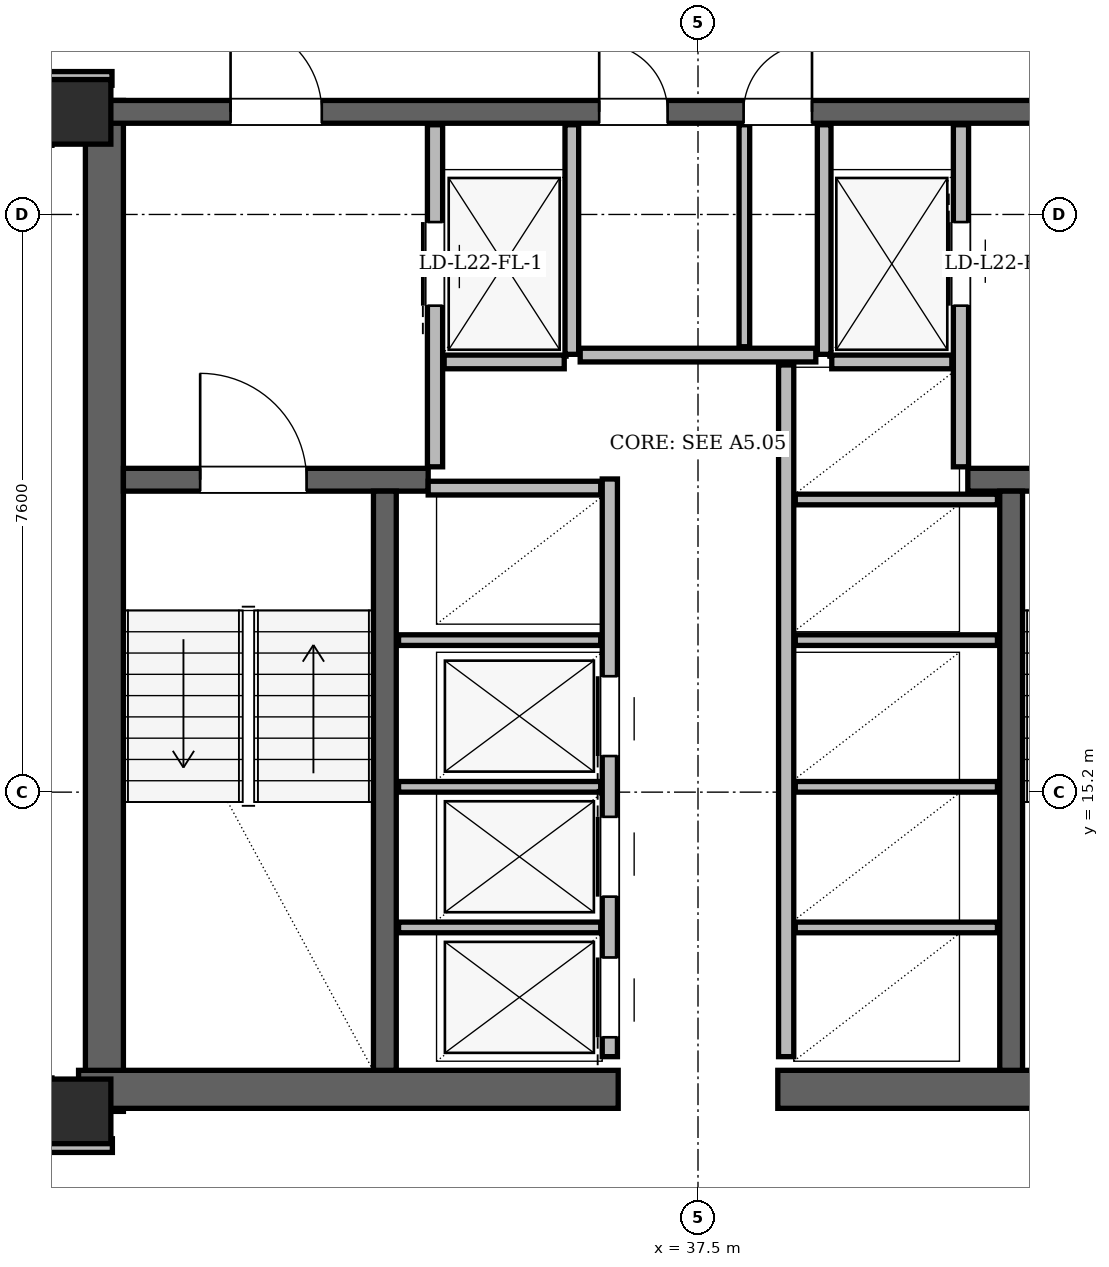
"""IFC4 building model, lengths in metres.
Left out: names, types, materials, properties, quantities, classifications, styles, units other than length and angle.
Written with IfcOpenShell. Run it as: python <this file> out.ifc"""

import sys

from ifc_helpers import new_model, si_unit, direction, frame, frame_2d, origin, origin_2d, place, context, subcontext, project, spatial, rectangle, hollow_rectangle, extrude, element, fill, save


model = new_model("IFC4")
c1 = context("Model", 3, precision=1e-05, world=origin(), true_north=direction((0.0, 1.0)))
c2 = subcontext(c1, "Body", "Model", "MODEL_VIEW")
j1 = project(units=[si_unit("LENGTHUNIT", "METRE"), si_unit("PLANEANGLEUNIT", "RADIAN")], contexts=[c1])
p1 = place(None, origin())
s1 = spatial("IfcSite", under=j1, at=p1, CompositionType="ELEMENT")
p2 = place(p1, origin())
s2 = spatial("IfcBuilding", under=s1, at=p2, CompositionType="ELEMENT")
p3 = place(p2, frame((0.0, 0.0, 86.1)))
s3 = spatial("IfcBuildingStorey", under=s2, at=p3, CompositionType="ELEMENT", Elevation=86.1)
for number, where, z_axis, x_axis in (
    (1, (29.35, 11.0, 0.0), (0.0, 0.0, 1.0), (1.0, 0.0, 0.0)),
    (2, (29.35, 24.15, 0.0), (0.0, 0.0, 1.0), (1.0, 0.0, 0.0)),
):
    element("IfcColumn", number, at=place(p3, frame(where, z_axis=z_axis, x_axis=x_axis)), inside=s3, PredefinedType="COLUMN", context=c2, shape_type="SweptSolid", body=[
        extrude(hollow_rectangle(XDim=0.85, YDim=0.85, WallThickness=0.07, at=origin_2d()), origin(), (0.0, 0.0, 1.0), 3.6),
    ])
p4 = place(p3, frame((29.69, 11.0, 0.0), z_axis=(0.0, 0.0, 1.0), x_axis=(0.0, 1.0, 0.0)))
e3 = element("IfcWall", 3, at=p4, inside=s3, PredefinedType="SHEAR", context=c2, shape_type="SweptSolid", body=[
    extrude(rectangle(XDim=13.3, YDim=0.5, at=frame_2d((6.65, 0.0))), origin(), (0.0, 0.0, 1.0), 3.36),
])
for number, where, z_axis, x_axis in (
    (4, (29.35, 11.29, 0.0), (0.0, 0.0, 1.0), (1.0, 0.0, 0.0)),
    (5, (38.55, 11.29, 0.0), (0.0, 0.0, 1.0), (1.0, 0.0, 0.0)),
):
    element("IfcWall", number, at=place(p3, frame(where, z_axis=z_axis, x_axis=x_axis)), inside=s3, PredefinedType="SHEAR", context=c2, shape_type="SweptSolid", body=[
        extrude(rectangle(XDim=7.1, YDim=0.5, at=frame_2d((3.55, 0.0))), origin(), (0.0, 0.0, 1.0), 3.36),
    ])
p5 = place(p3, frame((29.65, 24.15, 0.0), z_axis=(0.0, 0.0, 1.0), x_axis=(1.0, 0.0, 0.0)))
e6 = element("IfcWall", 6, at=p5, inside=s3, PredefinedType="SHEAR", context=c2, shape_type="SweptSolid", body=[
    extrude(rectangle(XDim=15.7, YDim=0.3, at=frame_2d((7.85, 0.0))), origin(), (0.0, 0.0, 1.0), 3.36),
])
p6 = place(p5, frame((1.7, 0.0, 0.0)))
e7 = element("IfcOpeningElement", 7, at=p6, cuts=e6, PredefinedType="OPENING", context=c2, shape_type="SweptSolid", body=[
    extrude(rectangle(XDim=1.2, YDim=2.2, at=frame_2d((0.6, 1.1))), frame((0.0, 0.15, 0.0), z_axis=(0.0, -1.0, 0.0), x_axis=(1.0, 0.0, 0.0)), (0.0, 0.0, 1.0), 0.3),
])
p7 = place(p5, frame((12.8, 0.0, 0.0)))
e8 = element("IfcOpeningElement", 8, at=p7, cuts=e6, PredefinedType="OPENING", context=c2, shape_type="SweptSolid", body=[
    extrude(rectangle(XDim=1.2, YDim=2.2, at=frame_2d((0.6, 1.1))), frame((0.0, 0.15, 0.0), z_axis=(0.0, -1.0, 0.0), x_axis=(1.0, 0.0, 0.0)), (0.0, 0.0, 1.0), 0.3),
])
p8 = place(p5, frame((6.55, 0.0, 0.0)))
e9 = element("IfcOpeningElement", 9, at=p8, cuts=e6, PredefinedType="OPENING", context=c2, shape_type="SweptSolid", body=[
    extrude(rectangle(XDim=0.9, YDim=2.05, at=frame_2d((0.45, 1.025))), frame((0.0, 0.15, 0.0), z_axis=(0.0, -1.0, 0.0), x_axis=(1.0, 0.0, 0.0)), (0.0, 0.0, 1.0), 0.3),
])
p9 = place(p5, frame((8.45, 0.0, 0.0)))
e10 = element("IfcOpeningElement", 10, at=p9, cuts=e6, PredefinedType="OPENING", context=c2, shape_type="SweptSolid", body=[
    extrude(rectangle(XDim=0.9, YDim=2.05, at=frame_2d((0.45, 1.025))), frame((0.0, 0.15, 0.0), z_axis=(0.0, -1.0, 0.0), x_axis=(1.0, 0.0, 0.0)), (0.0, 0.0, 1.0), 0.3),
])
p10 = place(p3, frame((29.94, 19.31, 0.0), z_axis=(0.0, 0.0, 1.0), x_axis=(1.0, 0.0, 0.0)))
e11 = element("IfcWall", 11, at=p10, inside=s3, PredefinedType="SHEAR", context=c2, shape_type="SweptSolid", body=[
    extrude(rectangle(XDim=4.01, YDim=0.3, at=frame_2d((2.005, 0.0))), origin(), (0.0, 0.0, 1.0), 3.36),
])
p11 = place(p10, frame((1.01, 0.0, 0.0)))
e12 = element("IfcOpeningElement", 12, at=p11, cuts=e11, PredefinedType="OPENING", context=c2, shape_type="SweptSolid", body=[
    extrude(rectangle(XDim=1.4, YDim=2.2, at=frame_2d((0.7, 1.1))), frame((0.0, 0.15, 0.0), z_axis=(0.0, -1.0, 0.0), x_axis=(1.0, 0.0, 0.0)), (0.0, 0.0, 1.0), 0.3),
])
p12 = place(p3, frame((41.05, 19.31, 0.0), z_axis=(0.0, 0.0, 1.0), x_axis=(1.0, 0.0, 0.0)))
e13 = element("IfcWall", 13, at=p12, inside=s3, PredefinedType="SHEAR", context=c2, shape_type="SweptSolid", body=[
    extrude(rectangle(XDim=4.01, YDim=0.3, at=frame_2d((2.005, 0.0))), origin(), (0.0, 0.0, 1.0), 3.36),
])
p13 = place(p12, frame((1.6, 0.0, 0.0)))
e14 = element("IfcOpeningElement", 14, at=p13, cuts=e13, PredefinedType="OPENING", context=c2, shape_type="SweptSolid", body=[
    extrude(rectangle(XDim=1.4, YDim=2.2, at=frame_2d((0.7, 1.1))), frame((0.0, 0.15, 0.0), z_axis=(0.0, -1.0, 0.0), x_axis=(1.0, 0.0, 0.0)), (0.0, 0.0, 1.0), 0.3),
])
for number, where, z_axis, x_axis in (
    (15, (33.38, 11.54, 0.0), (0.0, 0.0, 1.0), (0.0, 1.0, 0.0)),
    (16, (41.62, 11.54, 0.0), (0.0, 0.0, 1.0), (0.0, 1.0, 0.0)),
):
    element("IfcWall", number, at=place(p3, frame(where, z_axis=z_axis, x_axis=x_axis)), inside=s3, PredefinedType="SHEAR", context=c2, shape_type="SweptSolid", body=[
        extrude(rectangle(XDim=7.62, YDim=0.3, at=frame_2d((3.81, 0.0))), origin(), (0.0, 0.0, 1.0), 3.36),
    ])
p14 = place(p3, frame((31.179, 43.49, 0.0), z_axis=(0.0, 0.0, 1.0), x_axis=(-0.49999956034, -0.866025657622, 0.0)))
e17 = element("IfcWall", 17, at=p14, inside=s3, PredefinedType="SOLIDWALL", context=c2, shape_type="SweptSolid", body=[
    extrude(rectangle(XDim=34.192, YDim=0.34, at=frame_2d((17.096, 0.0))), origin(), (0.0, 0.0, 1.0), 2.578),
])
p15 = place(p14, frame((6.369, 0.0, 0.0)))
e18 = element("IfcOpeningElement", 18, at=p15, cuts=e17, PredefinedType="OPENING", context=c2, shape_type="SweptSolid", body=[
    extrude(rectangle(XDim=1.5, YDim=2.2, at=frame_2d((0.75, 1.1))), frame((0.0, 0.17, 0.0), z_axis=(0.0, -1.0, 0.0), x_axis=(1.0, 0.0, 0.0)), (0.0, 0.0, 1.0), 0.34),
])
p16 = place(p14, frame((26.128, 0.0, 0.0)))
e19 = element("IfcOpeningElement", 19, at=p16, cuts=e17, PredefinedType="OPENING", context=c2, shape_type="SweptSolid", body=[
    extrude(rectangle(XDim=1.5, YDim=2.2, at=frame_2d((0.75, 1.1))), frame((0.0, 0.17, 0.0), z_axis=(0.0, -1.0, 0.0), x_axis=(1.0, 0.0, 0.0)), (0.0, 0.0, 1.0), 0.34),
])
p17 = place(p14, frame((32.054, 0.0, 0.85)))
e20 = element("IfcOpeningElement", 20, at=p17, cuts=e17, PredefinedType="OPENING", context=c2, shape_type="SweptSolid", body=[
    extrude(rectangle(XDim=1.2, YDim=1.48, at=frame_2d((0.6, 0.74))), frame((0.0, 0.17, 0.0), z_axis=(0.0, -1.0, 0.0), x_axis=(1.0, 0.0, 0.0)), (0.0, 0.0, 1.0), 0.34),
])
p18 = place(p14, frame((29.596, 0.0, 0.85)))
e21 = element("IfcOpeningElement", 21, at=p18, cuts=e17, PredefinedType="OPENING", context=c2, shape_type="SweptSolid", body=[
    extrude(rectangle(XDim=1.2, YDim=1.48, at=frame_2d((0.6, 0.74))), frame((0.0, 0.17, 0.0), z_axis=(0.0, -1.0, 0.0), x_axis=(1.0, 0.0, 0.0)), (0.0, 0.0, 1.0), 0.34),
])
p19 = place(p14, frame((10.98, 0.0, 0.85)))
e22 = element("IfcOpeningElement", 22, at=p19, cuts=e17, PredefinedType="OPENING", context=c2, shape_type="SweptSolid", body=[
    extrude(rectangle(XDim=1.2, YDim=1.48, at=frame_2d((0.6, 0.74))), frame((0.0, 0.17, 0.0), z_axis=(0.0, -1.0, 0.0), x_axis=(1.0, 0.0, 0.0)), (0.0, 0.0, 1.0), 0.34),
])
p20 = place(p14, frame((14.68, 0.0, 0.85)))
e23 = element("IfcOpeningElement", 23, at=p20, cuts=e17, PredefinedType="OPENING", context=c2, shape_type="SweptSolid", body=[
    extrude(rectangle(XDim=1.2, YDim=1.48, at=frame_2d((0.6, 0.74))), frame((0.0, 0.17, 0.0), z_axis=(0.0, -1.0, 0.0), x_axis=(1.0, 0.0, 0.0)), (0.0, 0.0, 1.0), 0.34),
])
p21 = place(p14, frame((17.274, 0.0, 0.85)))
e24 = element("IfcOpeningElement", 24, at=p21, cuts=e17, PredefinedType="OPENING", context=c2, shape_type="SweptSolid", body=[
    extrude(rectangle(XDim=1.2, YDim=1.48, at=frame_2d((0.6, 0.74))), frame((0.0, 0.17, 0.0), z_axis=(0.0, -1.0, 0.0), x_axis=(1.0, 0.0, 0.0)), (0.0, 0.0, 1.0), 0.34),
])
p22 = place(p14, frame((1.27, 0.0, 0.85)))
e25 = element("IfcOpeningElement", 25, at=p22, cuts=e17, PredefinedType="OPENING", context=c2, shape_type="SweptSolid", body=[
    extrude(rectangle(XDim=1.2, YDim=1.48, at=frame_2d((0.6, 0.74))), frame((0.0, 0.17, 0.0), z_axis=(0.0, -1.0, 0.0), x_axis=(1.0, 0.0, 0.0)), (0.0, 0.0, 1.0), 0.34),
])
p23 = place(p3, frame((34.04, 19.48, 0.0), z_axis=(0.0, 0.0, 1.0), x_axis=(0.0, 1.0, 0.0)))
e26 = element("IfcWall", 26, at=p23, inside=s3, PredefinedType="PARTITIONING", context=c2, shape_type="SweptSolid", body=[
    extrude(rectangle(XDim=4.5, YDim=0.2, at=frame_2d((2.25, 0.0))), origin(), (0.0, 0.0, 1.0), 2.4),
])
p24 = place(p23, frame((2.12, 0.0, 0.0)))
e27 = element("IfcOpeningElement", 27, at=p24, cuts=e26, PredefinedType="OPENING", context=c2, shape_type="SweptSolid", body=[
    extrude(rectangle(XDim=1.1, YDim=2.2, at=frame_2d((0.55, 1.1))), frame((0.0, 0.1, 0.0), z_axis=(0.0, -1.0, 0.0), x_axis=(1.0, 0.0, 0.0)), (0.0, 0.0, 1.0), 0.2),
])
p25 = place(p3, frame((35.84, 20.96, 0.0), z_axis=(0.0, 0.0, 1.0), x_axis=(0.0, 1.0, 0.0)))
e28 = element("IfcWall", 28, at=p25, inside=s3, PredefinedType="PARTITIONING", context=c2, shape_type="SweptSolid", body=[
    extrude(rectangle(XDim=3.02, YDim=0.18, at=frame_2d((1.51, 0.0))), origin(), (0.0, 0.0, 1.0), 2.4),
])
p26 = place(p3, frame((34.16, 20.86, 0.0), z_axis=(0.0, 0.0, 1.0), x_axis=(1.0, 0.0, 0.0)))
e29 = element("IfcWall", 29, at=p26, inside=s3, PredefinedType="PARTITIONING", context=c2, shape_type="SweptSolid", body=[
    extrude(rectangle(XDim=1.58, YDim=0.18, at=frame_2d((0.79, 0.0))), origin(), (0.0, 0.0, 1.0), 3.36),
])
p27 = place(p3, frame((40.96, 19.48, 0.0), z_axis=(0.0, 0.0, 1.0), x_axis=(0.0, 1.0, 0.0)))
e30 = element("IfcWall", 30, at=p27, inside=s3, PredefinedType="PARTITIONING", context=c2, shape_type="SweptSolid", body=[
    extrude(rectangle(XDim=4.5, YDim=0.2, at=frame_2d((2.25, 0.0))), origin(), (0.0, 0.0, 1.0), 2.4),
])
p28 = place(p27, frame((2.12, 0.0, 0.0)))
e31 = element("IfcOpeningElement", 31, at=p28, cuts=e30, PredefinedType="OPENING", context=c2, shape_type="SweptSolid", body=[
    extrude(rectangle(XDim=1.1, YDim=2.2, at=frame_2d((0.55, 1.1))), frame((0.0, 0.1, 0.0), z_axis=(0.0, -1.0, 0.0), x_axis=(1.0, 0.0, 0.0)), (0.0, 0.0, 1.0), 0.2),
])
p29 = place(p3, frame((39.16, 20.96, 0.0), z_axis=(0.0, 0.0, 1.0), x_axis=(0.0, 1.0, 0.0)))
e32 = element("IfcWall", 32, at=p29, inside=s3, PredefinedType="PARTITIONING", context=c2, shape_type="SweptSolid", body=[
    extrude(rectangle(XDim=3.02, YDim=0.18, at=frame_2d((1.51, 0.0))), origin(), (0.0, 0.0, 1.0), 2.4),
])
p30 = place(p3, frame((39.26, 20.86, 0.0), z_axis=(0.0, 0.0, 1.0), x_axis=(1.0, 0.0, 0.0)))
e33 = element("IfcWall", 33, at=p30, inside=s3, PredefinedType="PARTITIONING", context=c2, shape_type="SweptSolid", body=[
    extrude(rectangle(XDim=1.58, YDim=0.18, at=frame_2d((0.79, 0.0))), origin(), (0.0, 0.0, 1.0), 3.36),
])
p31 = place(p3, frame((36.34, 11.72, 0.0), z_axis=(0.0, 0.0, 1.0), x_axis=(0.0, 1.0, 0.0)))
e34 = element("IfcWall", 34, at=p31, inside=s3, PredefinedType="PARTITIONING", context=c2, shape_type="SweptSolid", body=[
    extrude(rectangle(XDim=7.6, YDim=0.2, at=frame_2d((3.8, 0.0))), origin(), (0.0, 0.0, 1.0), 3.36),
])
p32 = place(p31, frame((0.255, 0.0, 0.0)))
e35 = element("IfcOpeningElement", 35, at=p32, cuts=e34, PredefinedType="OPENING", context=c2, shape_type="SweptSolid", body=[
    extrude(rectangle(XDim=1.05, YDim=2.15, at=frame_2d((0.525, 1.075))), frame((0.0, 0.1, 0.0), z_axis=(0.0, -1.0, 0.0), x_axis=(1.0, 0.0, 0.0)), (0.0, 0.0, 1.0), 0.2),
])
p33 = place(p31, frame((2.105, 0.0, 0.0)))
e36 = element("IfcOpeningElement", 36, at=p33, cuts=e34, PredefinedType="OPENING", context=c2, shape_type="SweptSolid", body=[
    extrude(rectangle(XDim=1.05, YDim=2.15, at=frame_2d((0.525, 1.075))), frame((0.0, 0.1, 0.0), z_axis=(0.0, -1.0, 0.0), x_axis=(1.0, 0.0, 0.0)), (0.0, 0.0, 1.0), 0.2),
])
p34 = place(p31, frame((3.955, 0.0, 0.0)))
e37 = element("IfcOpeningElement", 37, at=p34, cuts=e34, PredefinedType="OPENING", context=c2, shape_type="SweptSolid", body=[
    extrude(rectangle(XDim=1.05, YDim=2.15, at=frame_2d((0.525, 1.075))), frame((0.0, 0.1, 0.0), z_axis=(0.0, -1.0, 0.0), x_axis=(1.0, 0.0, 0.0)), (0.0, 0.0, 1.0), 0.2),
])
p35 = place(p3, frame((33.95, 19.2, 0.0), z_axis=(0.0, 0.0, 1.0), x_axis=(1.0, 0.0, 0.0)))
e38 = element("IfcWall", 38, at=p35, inside=s3, PredefinedType="PARTITIONING", context=c2, shape_type="SweptSolid", body=[
    extrude(rectangle(XDim=2.27, YDim=0.18, at=frame_2d((1.135, 0.0))), origin(), (0.0, 0.0, 1.0), 3.36),
])
for number, where, z_axis, x_axis in (
    (39, (33.56, 13.42, 0.0), (0.0, 0.0, 1.0), (1.0, 0.0, 0.0)),
    (40, (33.56, 15.27, 0.0), (0.0, 0.0, 1.0), (1.0, 0.0, 0.0)),
    (41, (33.56, 17.2, 0.0), (0.0, 0.0, 1.0), (1.0, 0.0, 0.0)),
):
    element("IfcWall", number, at=place(p3, frame(where, z_axis=z_axis, x_axis=x_axis)), inside=s3, PredefinedType="PARTITIONING", context=c2, shape_type="SweptSolid", body=[
        extrude(rectangle(XDim=2.66, YDim=0.14, at=frame_2d((1.33, 0.0))), origin(), (0.0, 0.0, 1.0), 3.36),
    ])
p36 = place(p3, frame((38.66, 11.72, 0.0), z_axis=(0.0, 0.0, 1.0), x_axis=(0.0, 1.0, 0.0)))
e42 = element("IfcWall", 42, at=p36, inside=s3, PredefinedType="PARTITIONING", context=c2, shape_type="SweptSolid", body=[
    extrude(rectangle(XDim=9.1, YDim=0.2, at=frame_2d((4.55, 0.0))), origin(), (0.0, 0.0, 1.0), 3.36),
])
for number, where, z_axis, x_axis in (
    (43, (38.78, 13.42, 0.0), (0.0, 0.0, 1.0), (1.0, 0.0, 0.0)),
    (44, (38.78, 15.27, 0.0), (0.0, 0.0, 1.0), (1.0, 0.0, 0.0)),
    (45, (38.78, 17.2, 0.0), (0.0, 0.0, 1.0), (1.0, 0.0, 0.0)),
    (46, (38.78, 19.05, 0.0), (0.0, 0.0, 1.0), (1.0, 0.0, 0.0)),
):
    element("IfcWall", number, at=place(p3, frame(where, z_axis=z_axis, x_axis=x_axis)), inside=s3, PredefinedType="PARTITIONING", context=c2, shape_type="SweptSolid", body=[
        extrude(rectangle(XDim=2.66, YDim=0.14, at=frame_2d((1.33, 0.0))), origin(), (0.0, 0.0, 1.0), 3.36),
    ])
p37 = place(p3, frame((35.95, 20.95, 0.0), z_axis=(0.0, 0.0, 1.0), x_axis=(1.0, 0.0, 0.0)))
e47 = element("IfcWall", 47, at=p37, inside=s3, PredefinedType="PARTITIONING", context=c2, shape_type="SweptSolid", body=[
    extrude(rectangle(XDim=3.1, YDim=0.18, at=frame_2d((1.55, 0.0))), origin(), (0.0, 0.0, 1.0), 3.36),
])
p38 = place(p3, frame((38.11, 21.06, 0.0), z_axis=(0.0, 0.0, 1.0), x_axis=(0.0, 1.0, 0.0)))
e48 = element("IfcWall", 48, at=p38, inside=s3, PredefinedType="PARTITIONING", context=c2, shape_type="SweptSolid", body=[
    extrude(rectangle(XDim=2.92, YDim=0.14, at=frame_2d((1.46, 0.0))), origin(), (0.0, 0.0, 1.0), 2.4),
])
p39 = place(p3, frame((28.905, 10.55, 0.0), z_axis=(0.0, 0.0, 1.0), x_axis=(1.0, 0.0, 0.0)))
e49 = element("IfcWall", 49, at=p39, inside=s3, PredefinedType="PARTITIONING", context=c2, shape_type="SweptSolid", body=[
    extrude(rectangle(XDim=0.89, YDim=0.18, at=frame_2d((0.445, 0.0))), origin(), (0.0, 0.0, 1.0), 3.36),
])
p40 = place(p3, frame((28.91, 24.59, 0.0), z_axis=(0.0, 0.0, 1.0), x_axis=(1.0, 0.0, 0.0)))
e50 = element("IfcWall", 50, at=p40, inside=s3, PredefinedType="PARTITIONING", context=c2, shape_type="SweptSolid", body=[
    extrude(rectangle(XDim=0.88, YDim=0.18, at=frame_2d((0.44, 0.0))), origin(), (0.0, 0.0, 1.0), 2.814),
])
p41 = place(p24, origin())
e51 = element("IfcDoor", 51, at=p41, inside=s3, OperationType="SLIDING_TO_LEFT", PredefinedType="DOOR", context=c2, shape_type="SweptSolid", body=[
    extrude(rectangle(XDim=1.1, YDim=2.2, at=frame_2d((0.55, 1.1))), frame((0.0, 0.025, 0.0), z_axis=(0.0, -1.0, 0.0), x_axis=(1.0, 0.0, 0.0)), (0.0, 0.0, 1.0), 0.05),
])
fill(e27, e51)
p42 = place(p28, origin())
e52 = element("IfcDoor", 52, at=p42, inside=s3, OperationType="SLIDING_TO_RIGHT", PredefinedType="DOOR", context=c2, shape_type="SweptSolid", body=[
    extrude(rectangle(XDim=1.1, YDim=2.2, at=frame_2d((0.55, 1.1))), frame((0.0, 0.025, 0.0), z_axis=(0.0, -1.0, 0.0), x_axis=(1.0, 0.0, 0.0)), (0.0, 0.0, 1.0), 0.05),
])
fill(e31, e52)
p43 = place(p32, origin())
e53 = element("IfcDoor", 53, at=p43, inside=s3, OperationType="SLIDING_TO_LEFT", PredefinedType="DOOR", context=c2, shape_type="SweptSolid", body=[
    extrude(rectangle(XDim=1.05, YDim=2.15, at=frame_2d((0.525, 1.075))), frame((0.0, 0.025, 0.0), z_axis=(0.0, -1.0, 0.0), x_axis=(1.0, 0.0, 0.0)), (0.0, 0.0, 1.0), 0.05),
])
fill(e35, e53)
p44 = place(p33, origin())
e54 = element("IfcDoor", 54, at=p44, inside=s3, OperationType="SLIDING_TO_RIGHT", PredefinedType="DOOR", context=c2, shape_type="SweptSolid", body=[
    extrude(rectangle(XDim=1.05, YDim=2.15, at=frame_2d((0.525, 1.075))), frame((0.0, 0.025, 0.0), z_axis=(0.0, -1.0, 0.0), x_axis=(1.0, 0.0, 0.0)), (0.0, 0.0, 1.0), 0.05),
])
fill(e36, e54)
p45 = place(p34, origin())
e55 = element("IfcDoor", 55, at=p45, inside=s3, OperationType="SLIDING_TO_LEFT", PredefinedType="DOOR", context=c2, shape_type="SweptSolid", body=[
    extrude(rectangle(XDim=1.05, YDim=2.15, at=frame_2d((0.525, 1.075))), frame((0.0, 0.025, 0.0), z_axis=(0.0, -1.0, 0.0), x_axis=(1.0, 0.0, 0.0)), (0.0, 0.0, 1.0), 0.05),
])
fill(e37, e55)
p46 = place(p11, origin())
e56 = element("IfcDoor", 56, at=p46, inside=s3, OperationType="SINGLE_SWING_LEFT", PredefinedType="DOOR", context=c2, shape_type="SweptSolid", body=[
    extrude(rectangle(XDim=1.4, YDim=2.2, at=frame_2d((0.7, 1.1))), frame((0.0, 0.025, 0.0), z_axis=(0.0, -1.0, 0.0), x_axis=(1.0, 0.0, 0.0)), (0.0, 0.0, 1.0), 0.05),
])
fill(e12, e56)
p47 = place(p6, origin())
e57 = element("IfcDoor", 57, at=p47, inside=s3, OperationType="SINGLE_SWING_LEFT", PredefinedType="DOOR", context=c2, shape_type="SweptSolid", body=[
    extrude(rectangle(XDim=1.2, YDim=2.2, at=frame_2d((0.6, 1.1))), frame((0.0, 0.025, 0.0), z_axis=(0.0, -1.0, 0.0), x_axis=(1.0, 0.0, 0.0)), (0.0, 0.0, 1.0), 0.05),
])
fill(e7, e57)
p48 = place(p8, origin())
e58 = element("IfcDoor", 58, at=p48, inside=s3, OperationType="SINGLE_SWING_LEFT", PredefinedType="DOOR", context=c2, shape_type="SweptSolid", body=[
    extrude(rectangle(XDim=0.9, YDim=2.05, at=frame_2d((0.45, 1.025))), frame((0.0, 0.025, 0.0), z_axis=(0.0, -1.0, 0.0), x_axis=(1.0, 0.0, 0.0)), (0.0, 0.0, 1.0), 0.05),
])
fill(e9, e58)
p49 = place(p9, origin())
e59 = element("IfcDoor", 59, at=p49, inside=s3, OperationType="SINGLE_SWING_RIGHT", PredefinedType="DOOR", context=c2, shape_type="SweptSolid", body=[
    extrude(rectangle(XDim=0.9, YDim=2.05, at=frame_2d((0.45, 1.025))), frame((0.0, 0.025, 0.0), z_axis=(0.0, -1.0, 0.0), x_axis=(1.0, 0.0, 0.0)), (0.0, 0.0, 1.0), 0.05),
])
fill(e10, e59)
save(model, sys.argv[1])
